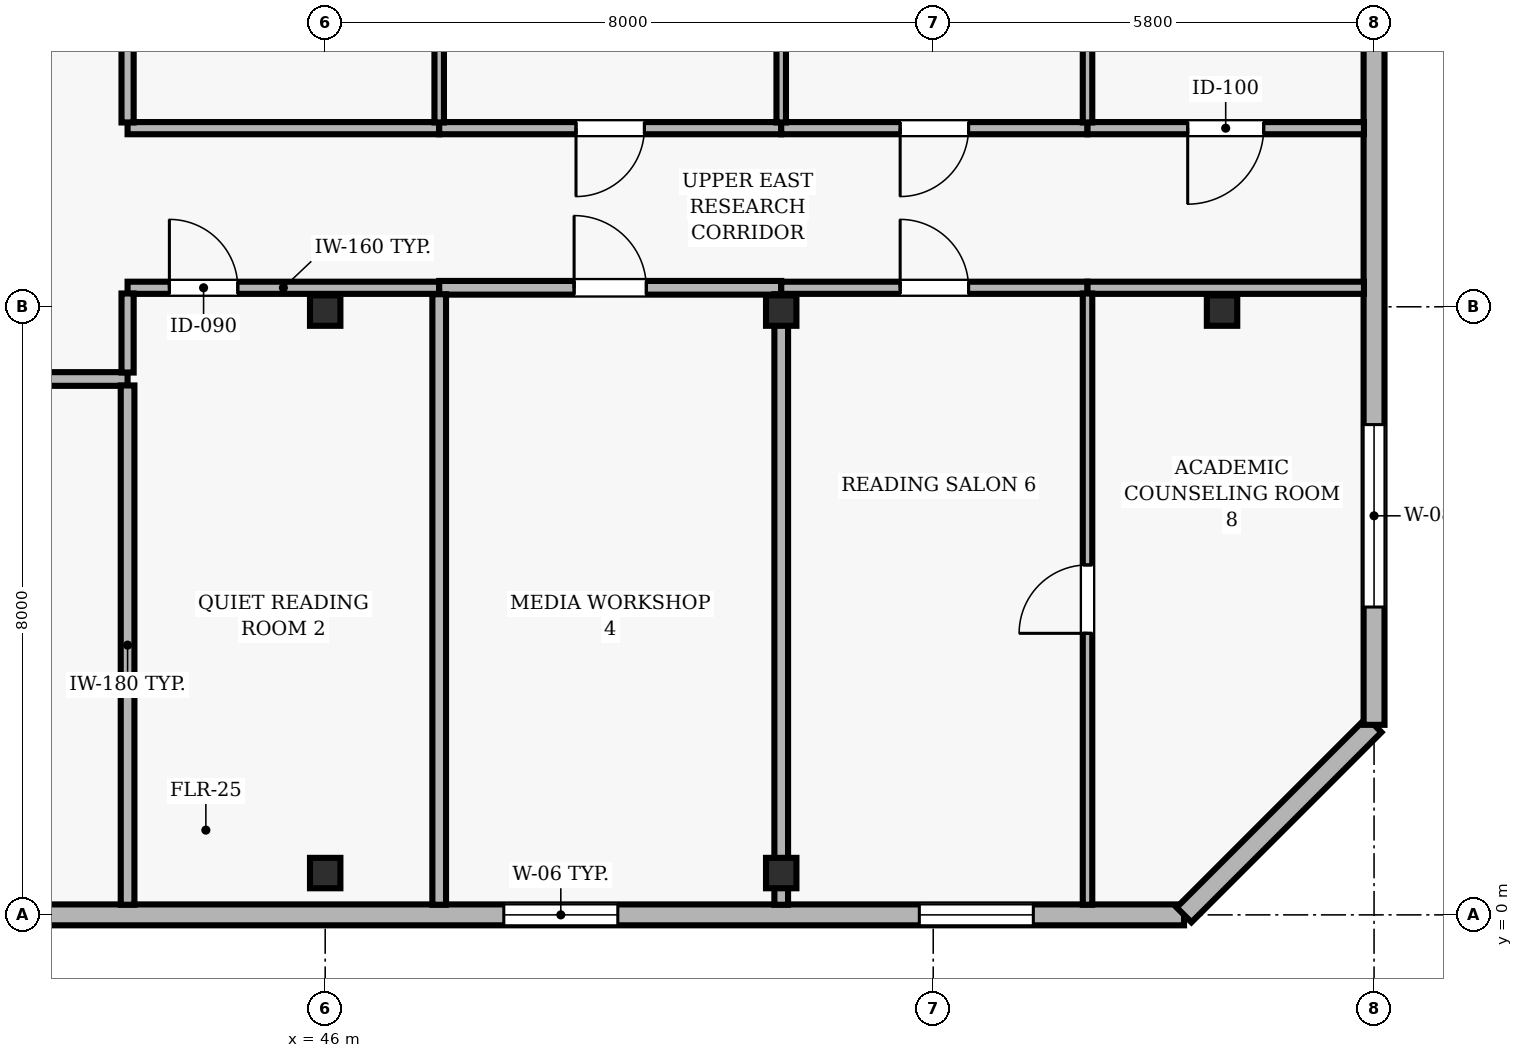
"""IFC4 building model, lengths in metres.
Left out: names, types, materials, properties, quantities, classifications, styles, units other than length and angle.
Written with IfcOpenShell. Run it as: python <this file> out.ifc"""

import sys

from ifc_helpers import new_model, si_unit, direction, frame, frame_2d, origin, origin_2d, place, context, subcontext, project, spatial, rectangle, hollow_rectangle, extrude, element, fill, save


model = new_model("IFC4")
c1 = context("Model", 3, precision=1e-05, world=origin(), true_north=direction((0.0, 1.0)))
c2 = subcontext(c1, "Body", "Model", "MODEL_VIEW")
j1 = project(units=[si_unit("LENGTHUNIT", "METRE"), si_unit("PLANEANGLEUNIT", "RADIAN")], contexts=[c1])
p1 = place(None, origin())
s1 = spatial("IfcSite", under=j1, at=p1, CompositionType="ELEMENT")
p2 = place(p1, origin())
s2 = spatial("IfcBuilding", under=s1, at=p2, CompositionType="ELEMENT")
p3 = place(p2, frame((0.0, 0.0, 267.7)))
s3 = spatial("IfcBuildingStorey", under=s2, at=p3, CompositionType="ELEMENT", Elevation=267.7)
for number, where, z_axis, x_axis in (
    (1, (46.0, 0.55, 0.0), (0.0, 0.0, 1.0), (1.0, 0.0, 0.0)),
    (2, (46.0, 7.95, 0.0), (0.0, 0.0, 1.0), (1.0, 0.0, 0.0)),
    (3, (52.0, 0.55, 0.0), (0.0, 0.0, 1.0), (1.0, 0.0, 0.0)),
    (4, (52.0, 7.95, 0.0), (0.0, 0.0, 1.0), (1.0, 0.0, 0.0)),
    (5, (57.8, 7.95, 0.0), (0.0, 0.0, 1.0), (1.0, 0.0, 0.0)),
):
    element("IfcColumn", number, at=place(p3, frame(where, z_axis=z_axis, x_axis=x_axis)), inside=s3, PredefinedType="COLUMN", context=c2, shape_type="SweptSolid", body=[
        extrude(hollow_rectangle(XDim=0.4, YDim=0.4, WallThickness=0.02, at=origin_2d()), origin(), (0.0, 0.0, 1.0), 3.9),
    ])
p4 = place(p3, frame((24.5, 0.0, 0.0), z_axis=(0.0, 0.0, 1.0), x_axis=(1.0, 0.0, 0.0)))
e6 = element("IfcWall", 6, at=p4, inside=s3, PredefinedType="SOLIDWALL", context=c2, shape_type="SweptSolid", body=[
    extrude(rectangle(XDim=32.8, YDim=0.275, at=frame_2d((16.4, 0.0))), origin(), (0.0, 0.0, 1.0), 3.69),
])
p5 = place(p4, frame((1.983, 0.0, 0.9)))
e7 = element("IfcOpeningElement", 7, at=p5, cuts=e6, PredefinedType="OPENING", context=c2, shape_type="SweptSolid", body=[
    extrude(rectangle(XDim=1.5, YDim=1.8, at=frame_2d((0.75, 0.9))), frame((0.0, 0.147, 0.0), z_axis=(0.0, -1.0, 0.0), x_axis=(1.0, 0.0, 0.0)), (0.0, 0.0, 1.0), 0.295),
])
p6 = place(p4, frame((8.35, 0.0, 0.9)))
e8 = element("IfcOpeningElement", 8, at=p6, cuts=e6, PredefinedType="OPENING", context=c2, shape_type="SweptSolid", body=[
    extrude(rectangle(XDim=1.5, YDim=1.8, at=frame_2d((0.75, 0.9))), frame((0.0, 0.147, 0.0), z_axis=(0.0, -1.0, 0.0), x_axis=(1.0, 0.0, 0.0)), (0.0, 0.0, 1.0), 0.295),
])
p7 = place(p4, frame((23.85, 0.0, 0.9)))
e9 = element("IfcOpeningElement", 9, at=p7, cuts=e6, PredefinedType="OPENING", context=c2, shape_type="SweptSolid", body=[
    extrude(rectangle(XDim=1.5, YDim=1.8, at=frame_2d((0.75, 0.9))), frame((0.0, 0.147, 0.0), z_axis=(0.0, -1.0, 0.0), x_axis=(1.0, 0.0, 0.0)), (0.0, 0.0, 1.0), 0.295),
])
p8 = place(p4, frame((29.317, 0.0, 0.9)))
e10 = element("IfcOpeningElement", 10, at=p8, cuts=e6, PredefinedType="OPENING", context=c2, shape_type="SweptSolid", body=[
    extrude(rectangle(XDim=1.5, YDim=1.8, at=frame_2d((0.75, 0.9))), frame((0.0, 0.147, 0.0), z_axis=(0.0, -1.0, 0.0), x_axis=(1.0, 0.0, 0.0)), (0.0, 0.0, 1.0), 0.295),
])
p9 = place(p3, frame((57.3, 0.0, 0.0), z_axis=(0.0, 0.0, 1.0), x_axis=(0.707106781187, 0.707106781187, 0.0)))
e11 = element("IfcWall", 11, at=p9, inside=s3, PredefinedType="SOLIDWALL", context=c2, shape_type="SweptSolid", body=[
    extrude(rectangle(XDim=3.536, YDim=0.275, at=frame_2d((1.768, 0.0))), origin(), (0.0, 0.0, 1.0), 3.69),
])
p10 = place(p3, frame((59.8, 2.5, 0.0), z_axis=(0.0, 0.0, 1.0), x_axis=(0.0, 1.0, 0.0)))
e12 = element("IfcWall", 12, at=p10, inside=s3, PredefinedType="SOLIDWALL", context=c2, shape_type="SweptSolid", body=[
    extrude(rectangle(XDim=11.0, YDim=0.275, at=frame_2d((5.5, 0.0))), origin(), (0.0, 0.0, 1.0), 3.69),
])
p11 = place(p10, frame((1.55, 0.0, 0.9)))
e13 = element("IfcOpeningElement", 13, at=p11, cuts=e12, PredefinedType="OPENING", context=c2, shape_type="SweptSolid", body=[
    extrude(rectangle(XDim=2.4, YDim=1.8, at=frame_2d((1.2, 0.9))), frame((0.0, 0.147, 0.0), z_axis=(0.0, -1.0, 0.0), x_axis=(1.0, 0.0, 0.0)), (0.0, 0.0, 1.0), 0.295),
])
p12 = place(p3, frame((38.05, 7.05, 0.0), z_axis=(0.0, 0.0, 1.0), x_axis=(1.0, 0.0, 0.0)))
e14 = element("IfcWall", 14, at=p12, inside=s3, PredefinedType="PARTITIONING", context=c2, shape_type="SweptSolid", body=[
    extrude(rectangle(XDim=5.35, YDim=0.18, at=frame_2d((2.675, 0.0))), origin(), (0.0, 0.0, 1.0), 3.69),
])
p13 = place(p12, frame((2.2, 0.0, 0.0)))
e15 = element("IfcOpeningElement", 15, at=p13, cuts=e14, PredefinedType="OPENING", context=c2, shape_type="SweptSolid", body=[
    extrude(rectangle(XDim=0.95, YDim=2.1, at=frame_2d((0.475, 1.05))), frame((0.0, 0.1, 0.0), z_axis=(0.0, -1.0, 0.0), x_axis=(1.0, 0.0, 0.0)), (0.0, 0.0, 1.0), 0.2),
])
p14 = place(p3, frame((43.4, 8.25, 0.0), z_axis=(0.0, 0.0, 1.0), x_axis=(1.0, 0.0, 0.0)))
e16 = element("IfcWall", 16, at=p14, inside=s3, PredefinedType="PARTITIONING", context=c2, shape_type="SweptSolid", body=[
    extrude(rectangle(XDim=4.1, YDim=0.16, at=frame_2d((2.05, 0.0))), origin(), (0.0, 0.0, 1.0), 3.227),
])
p15 = place(p14, frame((0.55, 0.0, 0.0)))
e17 = element("IfcOpeningElement", 17, at=p15, cuts=e16, PredefinedType="OPENING", context=c2, shape_type="SweptSolid", body=[
    extrude(rectangle(XDim=0.9, YDim=2.1, at=frame_2d((0.45, 1.05))), frame((0.0, 0.09, 0.0), z_axis=(0.0, -1.0, 0.0), x_axis=(1.0, 0.0, 0.0)), (0.0, 0.0, 1.0), 0.18),
])
p16 = place(p3, frame((47.5, 8.25, 0.0), z_axis=(0.0, 0.0, 1.0), x_axis=(1.0, 0.0, 0.0)))
e18 = element("IfcWall", 18, at=p16, inside=s3, PredefinedType="PARTITIONING", context=c2, shape_type="SweptSolid", body=[
    extrude(rectangle(XDim=4.5, YDim=0.18, at=frame_2d((2.25, 0.0))), origin(), (0.0, 0.0, 1.0), 3.227),
])
p17 = place(p16, frame((1.775, 0.0, 0.0)))
e19 = element("IfcOpeningElement", 19, at=p17, cuts=e18, PredefinedType="OPENING", context=c2, shape_type="SweptSolid", body=[
    extrude(rectangle(XDim=0.95, YDim=2.1, at=frame_2d((0.475, 1.05))), frame((0.0, 0.1, 0.0), z_axis=(0.0, -1.0, 0.0), x_axis=(1.0, 0.0, 0.0)), (0.0, 0.0, 1.0), 0.2),
])
p18 = place(p3, frame((47.5, 10.35, 0.0), z_axis=(0.0, 0.0, 1.0), x_axis=(-1.0, 0.0, 0.0)))
e20 = element("IfcWall", 20, at=p18, inside=s3, PredefinedType="PARTITIONING", context=c2, shape_type="SweptSolid", body=[
    extrude(rectangle(XDim=4.1, YDim=0.16, at=frame_2d((2.05, 0.0))), origin(), (0.0, 0.0, 1.0), 3.424),
])
p19 = place(p3, frame((52.0, 8.25, 0.0), z_axis=(0.0, 0.0, 1.0), x_axis=(1.0, 0.0, 0.0)))
e21 = element("IfcWall", 21, at=p19, inside=s3, PredefinedType="PARTITIONING", context=c2, shape_type="SweptSolid", body=[
    extrude(rectangle(XDim=4.03, YDim=0.16, at=frame_2d((2.015, 0.0))), origin(), (0.0, 0.0, 1.0), 3.227),
])
p20 = place(p19, frame((1.565, 0.0, 0.0)))
e22 = element("IfcOpeningElement", 22, at=p20, cuts=e21, PredefinedType="OPENING", context=c2, shape_type="SweptSolid", body=[
    extrude(rectangle(XDim=0.9, YDim=2.1, at=frame_2d((0.45, 1.05))), frame((0.0, 0.09, 0.0), z_axis=(0.0, -1.0, 0.0), x_axis=(1.0, 0.0, 0.0)), (0.0, 0.0, 1.0), 0.18),
])
p21 = place(p3, frame((52.0, 10.35, 0.0), z_axis=(0.0, 0.0, 1.0), x_axis=(-1.0, 0.0, 0.0)))
e23 = element("IfcWall", 23, at=p21, inside=s3, PredefinedType="PARTITIONING", context=c2, shape_type="SweptSolid", body=[
    extrude(rectangle(XDim=4.5, YDim=0.16, at=frame_2d((2.25, 0.0))), origin(), (0.0, 0.0, 1.0), 3.424),
])
p22 = place(p21, frame((1.8, 0.0, 0.0)))
e24 = element("IfcOpeningElement", 24, at=p22, cuts=e23, PredefinedType="OPENING", context=c2, shape_type="SweptSolid", body=[
    extrude(rectangle(XDim=0.9, YDim=2.1, at=frame_2d((0.45, 1.05))), frame((0.0, 0.09, 0.0), z_axis=(0.0, -1.0, 0.0), x_axis=(1.0, 0.0, 0.0)), (0.0, 0.0, 1.0), 0.18),
])
p23 = place(p3, frame((56.03, 8.25, 0.0), z_axis=(0.0, 0.0, 1.0), x_axis=(1.0, 0.0, 0.0)))
e25 = element("IfcWall", 25, at=p23, inside=s3, PredefinedType="PARTITIONING", context=c2, shape_type="SweptSolid", body=[
    extrude(rectangle(XDim=3.637, YDim=0.16, at=frame_2d((1.818, 0.0))), origin(), (0.0, 0.0, 1.0), 3.227),
])
p24 = place(p3, frame((56.03, 10.35, 0.0), z_axis=(0.0, 0.0, 1.0), x_axis=(-1.0, 0.0, 0.0)))
e26 = element("IfcWall", 26, at=p24, inside=s3, PredefinedType="PARTITIONING", context=c2, shape_type="SweptSolid", body=[
    extrude(rectangle(XDim=4.03, YDim=0.16, at=frame_2d((2.015, 0.0))), origin(), (0.0, 0.0, 1.0), 3.424),
])
p25 = place(p24, frame((1.565, 0.0, 0.0)))
e27 = element("IfcOpeningElement", 27, at=p25, cuts=e26, PredefinedType="OPENING", context=c2, shape_type="SweptSolid", body=[
    extrude(rectangle(XDim=0.9, YDim=2.1, at=frame_2d((0.45, 1.05))), frame((0.0, 0.09, 0.0), z_axis=(0.0, -1.0, 0.0), x_axis=(1.0, 0.0, 0.0)), (0.0, 0.0, 1.0), 0.18),
])
p26 = place(p3, frame((59.667, 10.35, 0.0), z_axis=(0.0, 0.0, 1.0), x_axis=(-1.0, 0.0, 0.0)))
e28 = element("IfcWall", 28, at=p26, inside=s3, PredefinedType="PARTITIONING", context=c2, shape_type="SweptSolid", body=[
    extrude(rectangle(XDim=3.637, YDim=0.16, at=frame_2d((1.818, 0.0))), origin(), (0.0, 0.0, 1.0), 3.424),
])
p27 = place(p26, frame((1.319, 0.0, 0.0)))
e29 = element("IfcOpeningElement", 29, at=p27, cuts=e28, PredefinedType="OPENING", context=c2, shape_type="SweptSolid", body=[
    extrude(rectangle(XDim=1.0, YDim=2.1, at=frame_2d((0.5, 1.05))), frame((0.0, 0.09, 0.0), z_axis=(0.0, -1.0, 0.0), x_axis=(1.0, 0.0, 0.0)), (0.0, 0.0, 1.0), 0.18),
])
p28 = place(p3, frame((43.4, 0.133, 0.0), z_axis=(0.0, 0.0, 1.0), x_axis=(0.0, 1.0, 0.0)))
e30 = element("IfcWall", 30, at=p28, inside=s3, PredefinedType="PARTITIONING", context=c2, shape_type="SweptSolid", body=[
    extrude(rectangle(XDim=6.832, YDim=0.18, at=frame_2d((3.416, 0.0))), origin(), (0.0, 0.0, 1.0), 3.69),
])
p29 = place(p3, frame((43.4, 7.135, 0.0), z_axis=(0.0, 0.0, 1.0), x_axis=(0.0, 1.0, 0.0)))
e31 = element("IfcWall", 31, at=p29, inside=s3, PredefinedType="PARTITIONING", context=c2, shape_type="SweptSolid", body=[
    extrude(rectangle(XDim=1.04, YDim=0.16, at=frame_2d((0.52, 0.0))), origin(), (0.0, 0.0, 1.0), 3.69),
])
p30 = place(p3, frame((43.4, 10.425, 0.0), z_axis=(0.0, 0.0, 1.0), x_axis=(0.0, 1.0, 0.0)))
e32 = element("IfcWall", 32, at=p30, inside=s3, PredefinedType="PARTITIONING", context=c2, shape_type="SweptSolid", body=[
    extrude(rectangle(XDim=5.5, YDim=0.16, at=frame_2d((2.75, 0.0))), origin(), (0.0, 0.0, 1.0), 3.69),
])
p31 = place(p30, frame((2.3, 0.0, 0.0)))
e33 = element("IfcOpeningElement", 33, at=p31, cuts=e32, PredefinedType="OPENING", context=c2, shape_type="SweptSolid", body=[
    extrude(rectangle(XDim=0.9, YDim=2.1, at=frame_2d((0.45, 1.05))), frame((0.0, 0.09, 0.0), z_axis=(0.0, -1.0, 0.0), x_axis=(1.0, 0.0, 0.0)), (0.0, 0.0, 1.0), 0.18),
])
p32 = place(p3, frame((47.5, 0.133, 0.0), z_axis=(0.0, 0.0, 1.0), x_axis=(0.0, 1.0, 0.0)))
e34 = element("IfcWall", 34, at=p32, inside=s3, PredefinedType="PARTITIONING", context=c2, shape_type="SweptSolid", body=[
    extrude(rectangle(XDim=8.032, YDim=0.18, at=frame_2d((4.016, 0.0))), origin(), (0.0, 0.0, 1.0), 3.69),
])
p33 = place(p3, frame((47.5, 10.425, 0.0), z_axis=(0.0, 0.0, 1.0), x_axis=(0.0, 1.0, 0.0)))
e35 = element("IfcWall", 35, at=p33, inside=s3, PredefinedType="PARTITIONING", context=c2, shape_type="SweptSolid", body=[
    extrude(rectangle(XDim=5.442, YDim=0.125, at=frame_2d((2.721, 0.0))), origin(), (0.0, 0.0, 1.0), 3.69),
])
p34 = place(p3, frame((52.0, 0.133, 0.0), z_axis=(0.0, 0.0, 1.0), x_axis=(0.0, 1.0, 0.0)))
e36 = element("IfcWall", 36, at=p34, inside=s3, PredefinedType="PARTITIONING", context=c2, shape_type="SweptSolid", body=[
    extrude(rectangle(XDim=8.032, YDim=0.18, at=frame_2d((4.016, 0.0))), origin(), (0.0, 0.0, 1.0), 3.227),
])
p35 = place(p3, frame((52.0, 10.425, 0.0), z_axis=(0.0, 0.0, 1.0), x_axis=(0.0, 1.0, 0.0)))
e37 = element("IfcWall", 37, at=p35, inside=s3, PredefinedType="PARTITIONING", context=c2, shape_type="SweptSolid", body=[
    extrude(rectangle(XDim=5.442, YDim=0.125, at=frame_2d((2.721, 0.0))), origin(), (0.0, 0.0, 1.0), 3.227),
])
p36 = place(p3, frame((56.03, 0.133, 0.0), z_axis=(0.0, 0.0, 1.0), x_axis=(0.0, 1.0, 0.0)))
e38 = element("IfcWall", 38, at=p36, inside=s3, PredefinedType="PARTITIONING", context=c2, shape_type="SweptSolid", body=[
    extrude(rectangle(XDim=8.042, YDim=0.125, at=frame_2d((4.021, 0.0))), origin(), (0.0, 0.0, 1.0), 3.69),
])
p37 = place(p36, frame((3.571, 0.0, 0.0)))
e39 = element("IfcOpeningElement", 39, at=p37, cuts=e38, PredefinedType="OPENING", context=c2, shape_type="SweptSolid", body=[
    extrude(rectangle(XDim=0.9, YDim=2.1, at=frame_2d((0.45, 1.05))), frame((0.0, 0.073, 0.0), z_axis=(0.0, -1.0, 0.0), x_axis=(1.0, 0.0, 0.0)), (0.0, 0.0, 1.0), 0.145),
])
p38 = place(p3, frame((56.03, 10.425, 0.0), z_axis=(0.0, 0.0, 1.0), x_axis=(0.0, 1.0, 0.0)))
e40 = element("IfcWall", 40, at=p38, inside=s3, PredefinedType="PARTITIONING", context=c2, shape_type="SweptSolid", body=[
    extrude(rectangle(XDim=5.442, YDim=0.125, at=frame_2d((2.721, 0.0))), origin(), (0.0, 0.0, 1.0), 3.69),
])
p39 = place(p7, origin())
e41 = element("IfcWindow", 41, at=p39, inside=s3, PartitioningType="SINGLE_PANEL", PredefinedType="WINDOW", context=c2, shape_type="SweptSolid", body=[
    extrude(rectangle(XDim=1.5, YDim=1.8, at=frame_2d((0.75, 0.9))), frame((0.0, 0.03, 0.0), z_axis=(0.0, -1.0, 0.0), x_axis=(1.0, 0.0, 0.0)), (0.0, 0.0, 1.0), 0.06),
])
fill(e9, e41)
p40 = place(p8, origin())
e42 = element("IfcWindow", 42, at=p40, inside=s3, PartitioningType="SINGLE_PANEL", PredefinedType="WINDOW", context=c2, shape_type="SweptSolid", body=[
    extrude(rectangle(XDim=1.5, YDim=1.8, at=frame_2d((0.75, 0.9))), frame((0.0, 0.03, 0.0), z_axis=(0.0, -1.0, 0.0), x_axis=(1.0, 0.0, 0.0)), (0.0, 0.0, 1.0), 0.06),
])
fill(e10, e42)
p41 = place(p11, origin())
e43 = element("IfcWindow", 43, at=p41, inside=s3, PartitioningType="SINGLE_PANEL", PredefinedType="WINDOW", context=c2, shape_type="SweptSolid", body=[
    extrude(rectangle(XDim=2.4, YDim=1.8, at=frame_2d((1.2, 0.9))), frame((0.0, 0.03, 0.0), z_axis=(0.0, -1.0, 0.0), x_axis=(1.0, 0.0, 0.0)), (0.0, 0.0, 1.0), 0.06),
])
fill(e13, e43)
p42 = place(p15, origin())
e44 = element("IfcDoor", 44, at=p42, inside=s3, OperationType="SINGLE_SWING_LEFT", PredefinedType="DOOR", context=c2, shape_type="SweptSolid", body=[
    extrude(rectangle(XDim=0.9, YDim=2.1, at=frame_2d((0.45, 1.05))), frame((0.0, 0.025, 0.0), z_axis=(0.0, -1.0, 0.0), x_axis=(1.0, 0.0, 0.0)), (0.0, 0.0, 1.0), 0.05),
])
fill(e17, e44)
p43 = place(p17, origin())
e45 = element("IfcDoor", 45, at=p43, inside=s3, OperationType="SINGLE_SWING_LEFT", PredefinedType="DOOR", context=c2, shape_type="SweptSolid", body=[
    extrude(rectangle(XDim=0.95, YDim=2.1, at=frame_2d((0.475, 1.05))), frame((0.0, 0.025, 0.0), z_axis=(0.0, -1.0, 0.0), x_axis=(1.0, 0.0, 0.0)), (0.0, 0.0, 1.0), 0.05),
])
fill(e19, e45)
p44 = place(p22, origin())
e46 = element("IfcDoor", 46, at=p44, inside=s3, OperationType="SINGLE_SWING_RIGHT", PredefinedType="DOOR", context=c2, shape_type="SweptSolid", body=[
    extrude(rectangle(XDim=0.9, YDim=2.1, at=frame_2d((0.45, 1.05))), frame((0.0, 0.025, 0.0), z_axis=(0.0, -1.0, 0.0), x_axis=(1.0, 0.0, 0.0)), (0.0, 0.0, 1.0), 0.05),
])
fill(e24, e46)
p45 = place(p20, origin())
e47 = element("IfcDoor", 47, at=p45, inside=s3, OperationType="SINGLE_SWING_LEFT", PredefinedType="DOOR", context=c2, shape_type="SweptSolid", body=[
    extrude(rectangle(XDim=0.9, YDim=2.1, at=frame_2d((0.45, 1.05))), frame((0.0, 0.025, 0.0), z_axis=(0.0, -1.0, 0.0), x_axis=(1.0, 0.0, 0.0)), (0.0, 0.0, 1.0), 0.05),
])
fill(e22, e47)
p46 = place(p25, origin())
e48 = element("IfcDoor", 48, at=p46, inside=s3, OperationType="SINGLE_SWING_RIGHT", PredefinedType="DOOR", context=c2, shape_type="SweptSolid", body=[
    extrude(rectangle(XDim=0.9, YDim=2.1, at=frame_2d((0.45, 1.05))), frame((0.0, 0.025, 0.0), z_axis=(0.0, -1.0, 0.0), x_axis=(1.0, 0.0, 0.0)), (0.0, 0.0, 1.0), 0.05),
])
fill(e27, e48)
p47 = place(p37, origin())
e49 = element("IfcDoor", 49, at=p47, inside=s3, OperationType="SINGLE_SWING_LEFT", PredefinedType="DOOR", context=c2, shape_type="SweptSolid", body=[
    extrude(rectangle(XDim=0.9, YDim=2.1, at=frame_2d((0.45, 1.05))), frame((0.0, 0.025, 0.0), z_axis=(0.0, -1.0, 0.0), x_axis=(1.0, 0.0, 0.0)), (0.0, 0.0, 1.0), 0.05),
])
fill(e39, e49)
p48 = place(p27, origin())
e50 = element("IfcDoor", 50, at=p48, inside=s3, OperationType="SINGLE_SWING_RIGHT", PredefinedType="DOOR", context=c2, shape_type="SweptSolid", body=[
    extrude(rectangle(XDim=1.0, YDim=2.1, at=frame_2d((0.5, 1.05))), frame((0.0, 0.025, 0.0), z_axis=(0.0, -1.0, 0.0), x_axis=(1.0, 0.0, 0.0)), (0.0, 0.0, 1.0), 0.05),
])
fill(e29, e50)
save(model, sys.argv[1])
